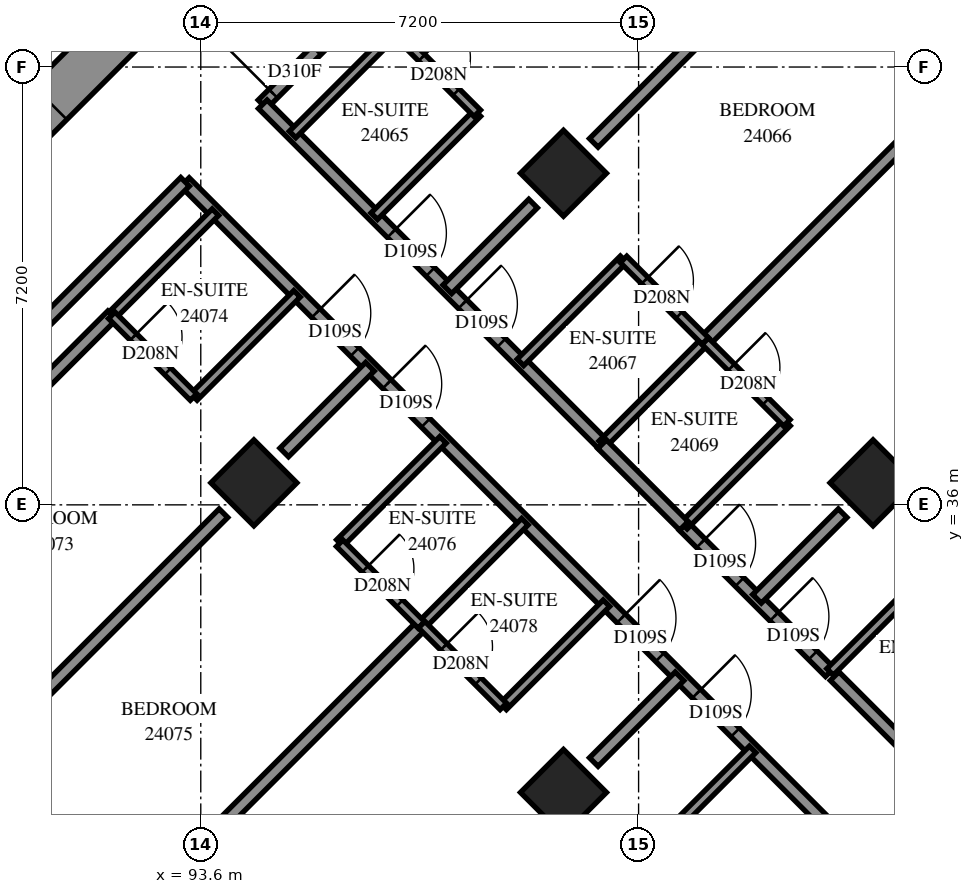
"""IFC4 building model, lengths in metres.
Left out: names, types, materials, properties, quantities, classifications, styles, units other than length and angle.
Written with IfcOpenShell. Run it as: python <this file> out.ifc"""

import sys

from ifc_helpers import new_model, si_unit, direction, frame, frame_2d, origin, origin_2d, place, context, subcontext, project, spatial, rectangle, extrude, element, fill, save


model = new_model("IFC4")
c1 = context("Model", 3, precision=1e-05, world=origin(), true_north=direction((0.0, 1.0)))
c2 = subcontext(c1, "Body", "Model", "MODEL_VIEW")
j1 = project(units=[si_unit("LENGTHUNIT", "METRE"), si_unit("PLANEANGLEUNIT", "RADIAN")], contexts=[c1])
p1 = place(None, origin())
s1 = spatial("IfcSite", under=j1, at=p1, CompositionType="ELEMENT")
p2 = place(p1, origin())
s2 = spatial("IfcBuilding", under=s1, at=p2, CompositionType="ELEMENT")
p3 = place(p2, frame((0.0, 0.0, 91.4)))
s3 = spatial("IfcBuildingStorey", under=s2, at=p3, CompositionType="ELEMENT", Elevation=91.4)
for number, where, z_axis, x_axis in (
    (1, (99.565, 41.453, 0.0), (0.0, 0.0, 1.0), (0.707, -0.707, 0.0)),
    (2, (94.474, 36.362, 0.0), (0.0, 0.0, 1.0), (0.707, -0.707, 0.0)),
    (3, (104.656, 36.362, 0.0), (0.0, 0.0, 1.0), (0.707, -0.707, 0.0)),
    (4, (99.565, 31.271, 0.0), (0.0, 0.0, 1.0), (0.707, -0.707, 0.0)),
):
    element("IfcColumn", number, at=place(p3, frame(where, z_axis=z_axis, x_axis=x_axis)), inside=s3, PredefinedType="COLUMN", context=c2, shape_type="SweptSolid", body=[
        extrude(rectangle(XDim=1.0, YDim=1.0, at=origin_2d()), origin(), (0.0, 0.0, 1.0), 3.1),
    ])
p4 = place(p3, frame((87.12, 38.625, -0.3), z_axis=(0.0, 0.0, 1.0), x_axis=(0.7071067812, 0.7071067812, 0.0)))
e5 = element("IfcWall", 5, at=p4, inside=s3, PredefinedType="SHEAR", context=c2, shape_type="SweptSolid", body=[
    extrude(rectangle(XDim=14.4, YDim=0.8, at=frame_2d((7.2, 0.0))), origin(), (0.0, 0.0, 1.0), 2.7),
])
p5 = place(p4, frame((4.55, 0.0, 0.3)))
e6 = element("IfcOpeningElement", 6, at=p5, cuts=e5, PredefinedType="OPENING", context=c2, shape_type="SweptSolid", body=[
    extrude(rectangle(XDim=1.1, YDim=2.1, at=frame_2d((0.55, 1.05))), frame((0.0, 0.41, 0.0), z_axis=(0.0, -1.0, 0.0), x_axis=(1.0, 0.0, 0.0)), (0.0, 0.0, 1.0), 0.82),
])
p6 = place(p4, frame((11.35, 0.0, 0.3)))
e7 = element("IfcOpeningElement", 7, at=p6, cuts=e5, PredefinedType="OPENING", context=c2, shape_type="SweptSolid", body=[
    extrude(rectangle(XDim=1.1, YDim=2.1, at=frame_2d((0.55, 1.05))), frame((0.0, 0.41, 0.0), z_axis=(0.0, -1.0, 0.0), x_axis=(1.0, 0.0, 0.0)), (0.0, 0.0, 1.0), 0.82),
])
p7 = place(p3, frame((93.339, 41.309, 0.0), z_axis=(0.0, 0.0, 1.0), x_axis=(0.7071067812, -0.7071067812, 0.0)))
e8 = element("IfcWall", 8, at=p7, inside=s3, PredefinedType="PARTITIONING", context=c2, shape_type="SweptSolid", body=[
    extrude(rectangle(XDim=18.702, YDim=0.2, at=frame_2d((9.351, 0.0))), origin(), (0.0, 0.0, 1.0), 3.1),
])
p8 = place(p7, frame((3.05, 0.0, 0.0)))
e9 = element("IfcOpeningElement", 9, at=p8, cuts=e8, PredefinedType="OPENING", context=c2, shape_type="SweptSolid", body=[
    extrude(rectangle(XDim=0.9, YDim=2.1, at=frame_2d((0.45, 1.05))), frame((0.0, 0.11, 0.0), z_axis=(0.0, -1.0, 0.0), x_axis=(1.0, 0.0, 0.0)), (0.0, 0.0, 1.0), 0.22),
])
p9 = place(p7, frame((4.7, 0.0, 0.0)))
e10 = element("IfcOpeningElement", 10, at=p9, cuts=e8, PredefinedType="OPENING", context=c2, shape_type="SweptSolid", body=[
    extrude(rectangle(XDim=0.9, YDim=2.1, at=frame_2d((0.45, 1.05))), frame((0.0, 0.11, 0.0), z_axis=(0.0, -1.0, 0.0), x_axis=(1.0, 0.0, 0.0)), (0.0, 0.0, 1.0), 0.22),
])
p10 = place(p7, frame((10.149, 0.0, 0.0)))
e11 = element("IfcOpeningElement", 11, at=p10, cuts=e8, PredefinedType="OPENING", context=c2, shape_type="SweptSolid", body=[
    extrude(rectangle(XDim=0.9, YDim=2.1, at=frame_2d((0.45, 1.05))), frame((0.0, 0.11, 0.0), z_axis=(0.0, -1.0, 0.0), x_axis=(1.0, 0.0, 0.0)), (0.0, 0.0, 1.0), 0.22),
])
p11 = place(p7, frame((11.9, 0.0, 0.0)))
e12 = element("IfcOpeningElement", 12, at=p11, cuts=e8, PredefinedType="OPENING", context=c2, shape_type="SweptSolid", body=[
    extrude(rectangle(XDim=0.9, YDim=2.1, at=frame_2d((0.45, 1.05))), frame((0.0, 0.11, 0.0), z_axis=(0.0, -1.0, 0.0), x_axis=(1.0, 0.0, 0.0)), (0.0, 0.0, 1.0), 0.22),
])
p12 = place(p7, frame((17.45, 0.0, 0.0)))
e13 = element("IfcOpeningElement", 13, at=p12, cuts=e8, PredefinedType="OPENING", context=c2, shape_type="SweptSolid", body=[
    extrude(rectangle(XDim=0.9, YDim=2.1, at=frame_2d((0.45, 1.05))), frame((0.0, 0.11, 0.0), z_axis=(0.0, -1.0, 0.0), x_axis=(1.0, 0.0, 0.0)), (0.0, 0.0, 1.0), 0.22),
])
p13 = place(p3, frame((86.835, 34.806, 0.0), z_axis=(0.0, 0.0, 1.0), x_axis=(0.7071067812, 0.7071067812, 0.0)))
e14 = element("IfcWall", 14, at=p13, inside=s3, PredefinedType="PARTITIONING", context=c2, shape_type="SweptSolid", body=[
    extrude(rectangle(XDim=9.201, YDim=0.2, at=frame_2d((4.601, 0.0))), origin(), (0.0, 0.0, 1.0), 3.1),
])
p14 = place(p3, frame((94.615, 42.587, 0.0), z_axis=(0.0, 0.0, 1.0), x_axis=(0.7071067812, 0.7071067812, 0.0)))
e15 = element("IfcWall", 15, at=p14, inside=s3, PredefinedType="PARTITIONING", context=c2, shape_type="SweptSolid", body=[
    extrude(rectangle(XDim=9.198, YDim=0.2, at=frame_2d((4.599, 0.0))), origin(), (0.0, 0.0, 1.0), 3.1),
])
p15 = place(p14, frame((0.248, 0.0, 0.0)))
e16 = element("IfcOpeningElement", 16, at=p15, cuts=e15, PredefinedType="OPENING", context=c2, shape_type="SweptSolid", body=[
    extrude(rectangle(XDim=1.0, YDim=2.1, at=frame_2d((0.5, 1.05))), frame((0.0, 0.11, 0.0), z_axis=(0.0, -1.0, 0.0), x_axis=(1.0, 0.0, 0.0)), (0.0, 0.0, 1.0), 0.22),
])
p16 = place(p3, frame((101.896, 38.698, 0.0), z_axis=(0.0, 0.0, 1.0), x_axis=(0.7072304079, 0.7069831328, 0.0)))
e17 = element("IfcWall", 17, at=p16, inside=s3, PredefinedType="PARTITIONING", context=c2, shape_type="SweptSolid", body=[
    extrude(rectangle(XDim=8.493, YDim=0.2, at=frame_2d((4.246, 0.0))), origin(), (0.0, 0.0, 1.0), 3.1),
])
p17 = place(p3, frame((86.345, 33.319, 0.0), z_axis=(0.0, 0.0, 1.0), x_axis=(0.7069848221, 0.7072287193, 0.0)))
e18 = element("IfcWall", 18, at=p17, inside=s3, PredefinedType="PARTITIONING", context=c2, shape_type="SweptSolid", body=[
    extrude(rectangle(XDim=8.2, YDim=0.2, at=frame_2d((4.1, 0.0))), origin(), (0.0, 0.0, 1.0), 3.1),
])
p18 = place(p3, frame((91.462, 28.254, 0.0), z_axis=(0.0, 0.0, 1.0), x_axis=(0.7072292685, 0.7069842727, 0.0)))
e19 = element("IfcWall", 19, at=p18, inside=s3, PredefinedType="PARTITIONING", context=c2, shape_type="SweptSolid", body=[
    extrude(rectangle(XDim=8.163, YDim=0.2, at=frame_2d((4.082, 0.0))), origin(), (0.0, 0.0, 1.0), 3.1),
])
p19 = place(p3, frame((94.62, 42.587, 0.0), z_axis=(0.0, 0.0, 1.0), x_axis=(0.7071067812, -0.7071067812, 0.0)))
e20 = element("IfcWall", 20, at=p19, inside=s3, PredefinedType="PARTITIONING", context=c2, shape_type="SweptSolid", body=[
    extrude(rectangle(XDim=7.9, YDim=0.2, at=frame_2d((3.95, 0.0))), origin(), (0.0, 0.0, 1.0), 3.1),
])
p20 = place(p19, frame((2.998, 0.0, 0.0)))
e21 = element("IfcOpeningElement", 21, at=p20, cuts=e20, PredefinedType="OPENING", context=c2, shape_type="SweptSolid", body=[
    extrude(rectangle(XDim=0.9, YDim=2.1, at=frame_2d((0.45, 1.05))), frame((0.0, 0.11, 0.0), z_axis=(0.0, -1.0, 0.0), x_axis=(1.0, 0.0, 0.0)), (0.0, 0.0, 1.0), 0.22),
])
p21 = place(p19, frame((4.649, 0.0, 0.0)))
e22 = element("IfcOpeningElement", 22, at=p21, cuts=e20, PredefinedType="OPENING", context=c2, shape_type="SweptSolid", body=[
    extrude(rectangle(XDim=0.9, YDim=2.1, at=frame_2d((0.45, 1.05))), frame((0.0, 0.11, 0.0), z_axis=(0.0, -1.0, 0.0), x_axis=(1.0, 0.0, 0.0)), (0.0, 0.0, 1.0), 0.22),
])
for number, where, z_axis, x_axis in (
    (23, (89.881, 31.771, 0.0), (0.0, 0.0, 1.0), (0.707, 0.707, 0.0)),
    (24, (100.063, 41.953, 0.0), (0.0, 0.0, 1.0), (0.707, 0.707, 0.0)),
):
    element("IfcWall", number, at=place(p3, frame(where, z_axis=z_axis, x_axis=x_axis)), inside=s3, PredefinedType="PARTITIONING", context=c2, shape_type="SweptSolid", body=[
        extrude(rectangle(XDim=5.787, YDim=0.2, at=frame_2d((2.893, 0.0))), origin(), (0.0, 0.0, 1.0), 3.1),
    ])
p22 = place(p3, frame((104.023, 33.184, 0.0), z_axis=(0.0, 0.0, 1.0), x_axis=(0.7071067812, -0.7071067812, 0.0)))
e25 = element("IfcWall", 25, at=p22, inside=s3, PredefinedType="PARTITIONING", context=c2, shape_type="SweptSolid", body=[
    extrude(rectangle(XDim=5.399, YDim=0.2, at=frame_2d((2.7, 0.0))), origin(), (0.0, 0.0, 1.0), 3.1),
])
p23 = place(p22, frame((4.08, 0.0, 0.0)))
e26 = element("IfcOpeningElement", 26, at=p23, cuts=e25, PredefinedType="OPENING", context=c2, shape_type="SweptSolid", body=[
    extrude(rectangle(XDim=0.9, YDim=2.1, at=frame_2d((0.45, 1.05))), frame((0.0, 0.11, 0.0), z_axis=(0.0, -1.0, 0.0), x_axis=(1.0, 0.0, 0.0)), (0.0, 0.0, 1.0), 0.22),
])
p24 = place(p3, frame((101.541, 35.651, 0.0), z_axis=(0.0, 0.0, 1.0), x_axis=(0.7071067812, -0.7071067812, 0.0)))
e27 = element("IfcWall", 27, at=p24, inside=s3, PredefinedType="PARTITIONING", context=c2, shape_type="SweptSolid", body=[
    extrude(rectangle(XDim=3.4, YDim=0.2, at=frame_2d((1.7, 0.0))), origin(), (0.0, 0.0, 1.0), 3.1),
])
p25 = place(p24, frame((0.4, 0.0, 0.0)))
e28 = element("IfcOpeningElement", 28, at=p25, cuts=e27, PredefinedType="OPENING", context=c2, shape_type="SweptSolid", body=[
    extrude(rectangle(XDim=0.9, YDim=2.1, at=frame_2d((0.45, 1.05))), frame((0.0, 0.11, 0.0), z_axis=(0.0, -1.0, 0.0), x_axis=(1.0, 0.0, 0.0)), (0.0, 0.0, 1.0), 0.22),
])
p26 = place(p24, frame((2.105, 0.0, 0.0)))
e29 = element("IfcOpeningElement", 29, at=p26, cuts=e27, PredefinedType="OPENING", context=c2, shape_type="SweptSolid", body=[
    extrude(rectangle(XDim=0.9, YDim=2.1, at=frame_2d((0.45, 1.05))), frame((0.0, 0.11, 0.0), z_axis=(0.0, -1.0, 0.0), x_axis=(1.0, 0.0, 0.0)), (0.0, 0.0, 1.0), 0.22),
])
for number, where, z_axis, x_axis in (
    (30, (100.977, 30.281, 0.0), (0.0, 0.0, 1.0), (0.707, 0.707, 0.0)),
    (31, (98.573, 32.685, 0.0), (0.0, 0.0, 1.0), (0.707, 0.707, 0.0)),
):
    element("IfcWall", number, at=place(p3, frame(where, z_axis=z_axis, x_axis=x_axis)), inside=s3, PredefinedType="PARTITIONING", context=c2, shape_type="SweptSolid", body=[
        extrude(rectangle(XDim=2.401, YDim=0.15, at=frame_2d((1.201, 0.0))), origin(), (0.0, 0.0, 1.0), 3.1),
    ])
for number, where, z_axis, x_axis in (
    (32, (92.143, 39.117, 0.0), (0.0, 0.0, 1.0), (0.708, 0.707, 0.0)),
    (33, (93.487, 37.773, 0.0), (0.0, 0.0, 1.0), (0.707, 0.708, 0.0)),
    (34, (97.234, 34.026, 0.0), (0.0, 0.0, 1.0), (0.707, 0.708, 0.0)),
    (35, (100.203, 36.997, 0.0), (0.0, 0.0, 1.0), (0.707, 0.708, 0.0)),
):
    element("IfcWall", number, at=place(p3, frame(where, z_axis=z_axis, x_axis=x_axis)), inside=s3, PredefinedType="PARTITIONING", context=c2, shape_type="SweptSolid", body=[
        extrude(rectangle(XDim=2.4, YDim=0.15, at=frame_2d((1.2, 0.0))), origin(), (0.0, 0.0, 1.0), 3.1),
    ])
for number, where, z_axis, x_axis in (
    (36, (96.453, 40.747, 0.0), (0.0, 0.0, 1.0), (0.707, 0.707, 0.0)),
    (37, (95.109, 42.091, 0.0), (0.0, 0.0, 1.0), (0.707, 0.707, 0.0)),
    (38, (95.887, 35.373, 0.0), (0.0, 0.0, 1.0), (0.707, 0.707, 0.0)),
    (39, (98.857, 38.343, 0.0), (0.0, 0.0, 1.0), (0.707, 0.707, 0.0)),
    (40, (101.545, 35.657, 0.0), (0.0, 0.0, 1.0), (0.707, 0.707, 0.0)),
    (41, (103.949, 33.253, 0.0), (0.0, 0.0, 1.0), (0.707, 0.707, 0.0)),
):
    element("IfcWall", number, at=place(p3, frame(where, z_axis=z_axis, x_axis=x_axis)), inside=s3, PredefinedType="PARTITIONING", context=c2, shape_type="SweptSolid", body=[
        extrude(rectangle(XDim=2.398, YDim=0.15, at=frame_2d((1.199, 0.0))), origin(), (0.0, 0.0, 1.0), 3.1),
    ])
for number, where, z_axis, x_axis in (
    (42, (100.063, 31.771, 0.0), (0.0, 0.0, 1.0), (0.707, 0.707, 0.0)),
    (43, (97.655, 39.545, 0.0), (0.0, 0.0, 1.0), (0.707, 0.707, 0.0)),
    (44, (94.972, 36.862, 0.0), (0.0, 0.0, 1.0), (0.707, 0.707, 0.0)),
):
    element("IfcWall", number, at=place(p3, frame(where, z_axis=z_axis, x_axis=x_axis)), inside=s3, PredefinedType="PARTITIONING", context=c2, shape_type="SweptSolid", body=[
        extrude(rectangle(XDim=1.994, YDim=0.2, at=frame_2d((0.997, 0.0))), origin(), (0.0, 0.0, 1.0), 3.1),
    ])
p27 = place(p3, frame((102.747, 34.455, 0.0), z_axis=(0.0, 0.0, 1.0), x_axis=(0.7071067812, 0.7071067812, 0.0)))
e45 = element("IfcWall", 45, at=p27, inside=s3, PredefinedType="PARTITIONING", context=c2, shape_type="SweptSolid", body=[
    extrude(rectangle(XDim=1.991, YDim=0.2, at=frame_2d((0.996, 0.0))), origin(), (0.0, 0.0, 1.0), 3.1),
])
p28 = place(p3, frame((96.803, 43.783, 0.0), z_axis=(0.0, 0.0, 1.0), x_axis=(0.7071067812, -0.7071067812, 0.0)))
e46 = element("IfcWall", 46, at=p28, inside=s3, PredefinedType="PARTITIONING", context=c2, shape_type="SweptSolid", body=[
    extrude(rectangle(XDim=1.901, YDim=0.15, at=frame_2d((0.95, 0.0))), origin(), (0.0, 0.0, 1.0), 3.1),
])
p29 = place(p28, frame((0.609, 0.0, 0.0)))
e47 = element("IfcOpeningElement", 47, at=p29, cuts=e46, PredefinedType="OPENING", context=c2, shape_type="SweptSolid", body=[
    extrude(rectangle(XDim=0.8, YDim=2.1, at=frame_2d((0.4, 1.05))), frame((0.0, 0.085, 0.0), z_axis=(0.0, -1.0, 0.0), x_axis=(1.0, 0.0, 0.0)), (0.0, 0.0, 1.0), 0.17),
])
p30 = place(p3, frame((101.894, 38.693, 0.0), z_axis=(0.0, 0.0, 1.0), x_axis=(0.7071067812, -0.7071067812, 0.0)))
e48 = element("IfcWall", 48, at=p30, inside=s3, PredefinedType="PARTITIONING", context=c2, shape_type="SweptSolid", body=[
    extrude(rectangle(XDim=1.901, YDim=0.15, at=frame_2d((0.95, 0.0))), origin(), (0.0, 0.0, 1.0), 3.1),
])
p31 = place(p30, frame((0.608, 0.0, 0.0)))
e49 = element("IfcOpeningElement", 49, at=p31, cuts=e48, PredefinedType="OPENING", context=c2, shape_type="SweptSolid", body=[
    extrude(rectangle(XDim=0.8, YDim=2.1, at=frame_2d((0.4, 1.05))), frame((0.0, 0.085, 0.0), z_axis=(0.0, -1.0, 0.0), x_axis=(1.0, 0.0, 0.0)), (0.0, 0.0, 1.0), 0.17),
])
p32 = place(p3, frame((95.885, 35.369, 0.0), z_axis=(0.0, 0.0, 1.0), x_axis=(0.7071067812, -0.7071067812, 0.0)))
e50 = element("IfcWall", 50, at=p32, inside=s3, PredefinedType="PARTITIONING", context=c2, shape_type="SweptSolid", body=[
    extrude(rectangle(XDim=1.901, YDim=0.15, at=frame_2d((0.95, 0.0))), origin(), (0.0, 0.0, 1.0), 3.1),
])
p33 = place(p32, frame((0.595, 0.0, 0.0)))
e51 = element("IfcOpeningElement", 51, at=p33, cuts=e50, PredefinedType="OPENING", context=c2, shape_type="SweptSolid", body=[
    extrude(rectangle(XDim=0.8, YDim=2.1, at=frame_2d((0.4, 1.05))), frame((0.0, 0.085, 0.0), z_axis=(0.0, -1.0, 0.0), x_axis=(1.0, 0.0, 0.0)), (0.0, 0.0, 1.0), 0.17),
])
p34 = place(p3, frame((92.137, 39.117, 0.0), z_axis=(0.0, 0.0, 1.0), x_axis=(0.7071067812, -0.7071067812, 0.0)))
e52 = element("IfcWall", 52, at=p34, inside=s3, PredefinedType="PARTITIONING", context=c2, shape_type="SweptSolid", body=[
    extrude(rectangle(XDim=1.901, YDim=0.15, at=frame_2d((0.95, 0.0))), origin(), (0.0, 0.0, 1.0), 3.1),
])
p35 = place(p34, frame((0.502, 0.0, 0.0)))
e53 = element("IfcOpeningElement", 53, at=p35, cuts=e52, PredefinedType="OPENING", context=c2, shape_type="SweptSolid", body=[
    extrude(rectangle(XDim=0.8, YDim=2.1, at=frame_2d((0.4, 1.05))), frame((0.0, 0.085, 0.0), z_axis=(0.0, -1.0, 0.0), x_axis=(1.0, 0.0, 0.0)), (0.0, 0.0, 1.0), 0.17),
])
p36 = place(p3, frame((100.553, 40.037, 0.0), z_axis=(0.0, 0.0, 1.0), x_axis=(0.7076330979, -0.7065800724, 0.0)))
e54 = element("IfcWall", 54, at=p36, inside=s3, PredefinedType="PARTITIONING", context=c2, shape_type="SweptSolid", body=[
    extrude(rectangle(XDim=1.899, YDim=0.15, at=frame_2d((0.95, 0.0))), origin(), (0.0, 0.0, 1.0), 3.1),
])
p37 = place(p36, frame((0.493, 0.0, 0.0)))
e55 = element("IfcOpeningElement", 55, at=p37, cuts=e54, PredefinedType="OPENING", context=c2, shape_type="SweptSolid", body=[
    extrude(rectangle(XDim=0.8, YDim=2.1, at=frame_2d((0.4, 1.05))), frame((0.0, 0.085, 0.0), z_axis=(0.0, -1.0, 0.0), x_axis=(1.0, 0.0, 0.0)), (0.0, 0.0, 1.0), 0.17),
])
p38 = place(p3, frame((97.233, 34.029, 0.0), z_axis=(0.0, 0.0, 1.0), x_axis=(0.7065800724, -0.7076330979, 0.0)))
e56 = element("IfcWall", 56, at=p38, inside=s3, PredefinedType="PARTITIONING", context=c2, shape_type="SweptSolid", body=[
    extrude(rectangle(XDim=1.899, YDim=0.15, at=frame_2d((0.95, 0.0))), origin(), (0.0, 0.0, 1.0), 3.1),
])
p39 = place(p38, frame((0.515, 0.0, 0.0)))
e57 = element("IfcOpeningElement", 57, at=p39, cuts=e56, PredefinedType="OPENING", context=c2, shape_type="SweptSolid", body=[
    extrude(rectangle(XDim=0.8, YDim=2.1, at=frame_2d((0.4, 1.05))), frame((0.0, 0.085, 0.0), z_axis=(0.0, -1.0, 0.0), x_axis=(1.0, 0.0, 0.0)), (0.0, 0.0, 1.0), 0.17),
])
p40 = place(p3, frame((100.201, 36.997, 0.0), z_axis=(0.0, 0.0, 1.0), x_axis=(0.7076330979, -0.7065800724, 0.0)))
e58 = element("IfcWall", 58, at=p40, inside=s3, PredefinedType="PARTITIONING", context=c2, shape_type="SweptSolid", body=[
    extrude(rectangle(XDim=1.899, YDim=0.2, at=frame_2d((0.95, 0.0))), origin(), (0.0, 0.0, 1.0), 3.1),
])
p41 = place(p15, origin())
e59 = element("IfcDoor", 59, at=p41, inside=s3, OperationType="SINGLE_SWING_RIGHT", PredefinedType="DOOR", context=c2, shape_type="SweptSolid", body=[
    extrude(rectangle(XDim=1.0, YDim=2.1, at=frame_2d((0.5, 1.05))), frame((0.0, 0.025, 0.0), z_axis=(0.0, -1.0, 0.0), x_axis=(1.0, 0.0, 0.0)), (0.0, 0.0, 1.0), 0.05),
])
fill(e16, e59)
p42 = place(p20, origin())
e60 = element("IfcDoor", 60, at=p42, inside=s3, OperationType="SINGLE_SWING_RIGHT", PredefinedType="DOOR", context=c2, shape_type="SweptSolid", body=[
    extrude(rectangle(XDim=0.9, YDim=2.1, at=frame_2d((0.45, 1.05))), frame((0.0, 0.025, 0.0), z_axis=(0.0, -1.0, 0.0), x_axis=(1.0, 0.0, 0.0)), (0.0, 0.0, 1.0), 0.05),
])
fill(e21, e60)
p43 = place(p29, origin())
e61 = element("IfcDoor", 61, at=p43, inside=s3, OperationType="SINGLE_SWING_RIGHT", PredefinedType="DOOR", context=c2, shape_type="SweptSolid", body=[
    extrude(rectangle(XDim=0.8, YDim=2.1, at=frame_2d((0.4, 1.05))), frame((0.0, 0.025, 0.0), z_axis=(0.0, -1.0, 0.0), x_axis=(1.0, 0.0, 0.0)), (0.0, 0.0, 1.0), 0.05),
])
fill(e47, e61)
p44 = place(p21, origin())
e62 = element("IfcDoor", 62, at=p44, inside=s3, OperationType="SINGLE_SWING_LEFT", PredefinedType="DOOR", context=c2, shape_type="SweptSolid", body=[
    extrude(rectangle(XDim=0.9, YDim=2.1, at=frame_2d((0.45, 1.05))), frame((0.0, 0.025, 0.0), z_axis=(0.0, -1.0, 0.0), x_axis=(1.0, 0.0, 0.0)), (0.0, 0.0, 1.0), 0.05),
])
fill(e22, e62)
p45 = place(p37, origin())
e63 = element("IfcDoor", 63, at=p45, inside=s3, OperationType="SINGLE_SWING_RIGHT", PredefinedType="DOOR", context=c2, shape_type="SweptSolid", body=[
    extrude(rectangle(XDim=0.8, YDim=2.1, at=frame_2d((0.4, 1.05))), frame((0.0, 0.025, 0.0), z_axis=(0.0, -1.0, 0.0), x_axis=(1.0, 0.0, 0.0)), (0.0, 0.0, 1.0), 0.05),
])
fill(e55, e63)
p46 = place(p25, origin())
e64 = element("IfcDoor", 64, at=p46, inside=s3, OperationType="SINGLE_SWING_RIGHT", PredefinedType="DOOR", context=c2, shape_type="SweptSolid", body=[
    extrude(rectangle(XDim=0.9, YDim=2.1, at=frame_2d((0.45, 1.05))), frame((0.0, 0.025, 0.0), z_axis=(0.0, -1.0, 0.0), x_axis=(1.0, 0.0, 0.0)), (0.0, 0.0, 1.0), 0.05),
])
fill(e28, e64)
p47 = place(p31, origin())
e65 = element("IfcDoor", 65, at=p47, inside=s3, OperationType="SINGLE_SWING_RIGHT", PredefinedType="DOOR", context=c2, shape_type="SweptSolid", body=[
    extrude(rectangle(XDim=0.8, YDim=2.1, at=frame_2d((0.4, 1.05))), frame((0.0, 0.025, 0.0), z_axis=(0.0, -1.0, 0.0), x_axis=(1.0, 0.0, 0.0)), (0.0, 0.0, 1.0), 0.05),
])
fill(e49, e65)
p48 = place(p26, origin())
e66 = element("IfcDoor", 66, at=p48, inside=s3, OperationType="SINGLE_SWING_LEFT", PredefinedType="DOOR", context=c2, shape_type="SweptSolid", body=[
    extrude(rectangle(XDim=0.9, YDim=2.1, at=frame_2d((0.45, 1.05))), frame((0.0, 0.025, 0.0), z_axis=(0.0, -1.0, 0.0), x_axis=(1.0, 0.0, 0.0)), (0.0, 0.0, 1.0), 0.05),
])
fill(e29, e66)
p49 = place(p8, origin())
e67 = element("IfcDoor", 67, at=p49, inside=s3, OperationType="SINGLE_SWING_LEFT", PredefinedType="DOOR", context=c2, shape_type="SweptSolid", body=[
    extrude(rectangle(XDim=0.9, YDim=2.1, at=frame_2d((0.45, 1.05))), frame((0.0, 0.025, 0.0), z_axis=(0.0, -1.0, 0.0), x_axis=(1.0, 0.0, 0.0)), (0.0, 0.0, 1.0), 0.05),
])
fill(e9, e67)
p50 = place(p35, origin())
e68 = element("IfcDoor", 68, at=p50, inside=s3, OperationType="SINGLE_SWING_RIGHT", PredefinedType="DOOR", context=c2, shape_type="SweptSolid", body=[
    extrude(rectangle(XDim=0.8, YDim=2.1, at=frame_2d((0.4, 1.05))), frame((0.0, 0.025, 0.0), z_axis=(0.0, -1.0, 0.0), x_axis=(1.0, 0.0, 0.0)), (0.0, 0.0, 1.0), 0.05),
])
fill(e53, e68)
p51 = place(p9, origin())
e69 = element("IfcDoor", 69, at=p51, inside=s3, OperationType="SINGLE_SWING_RIGHT", PredefinedType="DOOR", context=c2, shape_type="SweptSolid", body=[
    extrude(rectangle(XDim=0.9, YDim=2.1, at=frame_2d((0.45, 1.05))), frame((0.0, 0.025, 0.0), z_axis=(0.0, -1.0, 0.0), x_axis=(1.0, 0.0, 0.0)), (0.0, 0.0, 1.0), 0.05),
])
fill(e10, e69)
p52 = place(p33, origin())
e70 = element("IfcDoor", 70, at=p52, inside=s3, OperationType="SINGLE_SWING_RIGHT", PredefinedType="DOOR", context=c2, shape_type="SweptSolid", body=[
    extrude(rectangle(XDim=0.8, YDim=2.1, at=frame_2d((0.4, 1.05))), frame((0.0, 0.025, 0.0), z_axis=(0.0, -1.0, 0.0), x_axis=(1.0, 0.0, 0.0)), (0.0, 0.0, 1.0), 0.05),
])
fill(e51, e70)
p53 = place(p10, origin())
e71 = element("IfcDoor", 71, at=p53, inside=s3, OperationType="SINGLE_SWING_LEFT", PredefinedType="DOOR", context=c2, shape_type="SweptSolid", body=[
    extrude(rectangle(XDim=0.9, YDim=2.1, at=frame_2d((0.45, 1.05))), frame((0.0, 0.025, 0.0), z_axis=(0.0, -1.0, 0.0), x_axis=(1.0, 0.0, 0.0)), (0.0, 0.0, 1.0), 0.05),
])
fill(e11, e71)
p54 = place(p39, origin())
e72 = element("IfcDoor", 72, at=p54, inside=s3, OperationType="SINGLE_SWING_RIGHT", PredefinedType="DOOR", context=c2, shape_type="SweptSolid", body=[
    extrude(rectangle(XDim=0.8, YDim=2.1, at=frame_2d((0.4, 1.05))), frame((0.0, 0.025, 0.0), z_axis=(0.0, -1.0, 0.0), x_axis=(1.0, 0.0, 0.0)), (0.0, 0.0, 1.0), 0.05),
])
fill(e57, e72)
p55 = place(p11, origin())
e73 = element("IfcDoor", 73, at=p55, inside=s3, OperationType="SINGLE_SWING_RIGHT", PredefinedType="DOOR", context=c2, shape_type="SweptSolid", body=[
    extrude(rectangle(XDim=0.9, YDim=2.1, at=frame_2d((0.45, 1.05))), frame((0.0, 0.025, 0.0), z_axis=(0.0, -1.0, 0.0), x_axis=(1.0, 0.0, 0.0)), (0.0, 0.0, 1.0), 0.05),
])
fill(e12, e73)
save(model, sys.argv[1])
